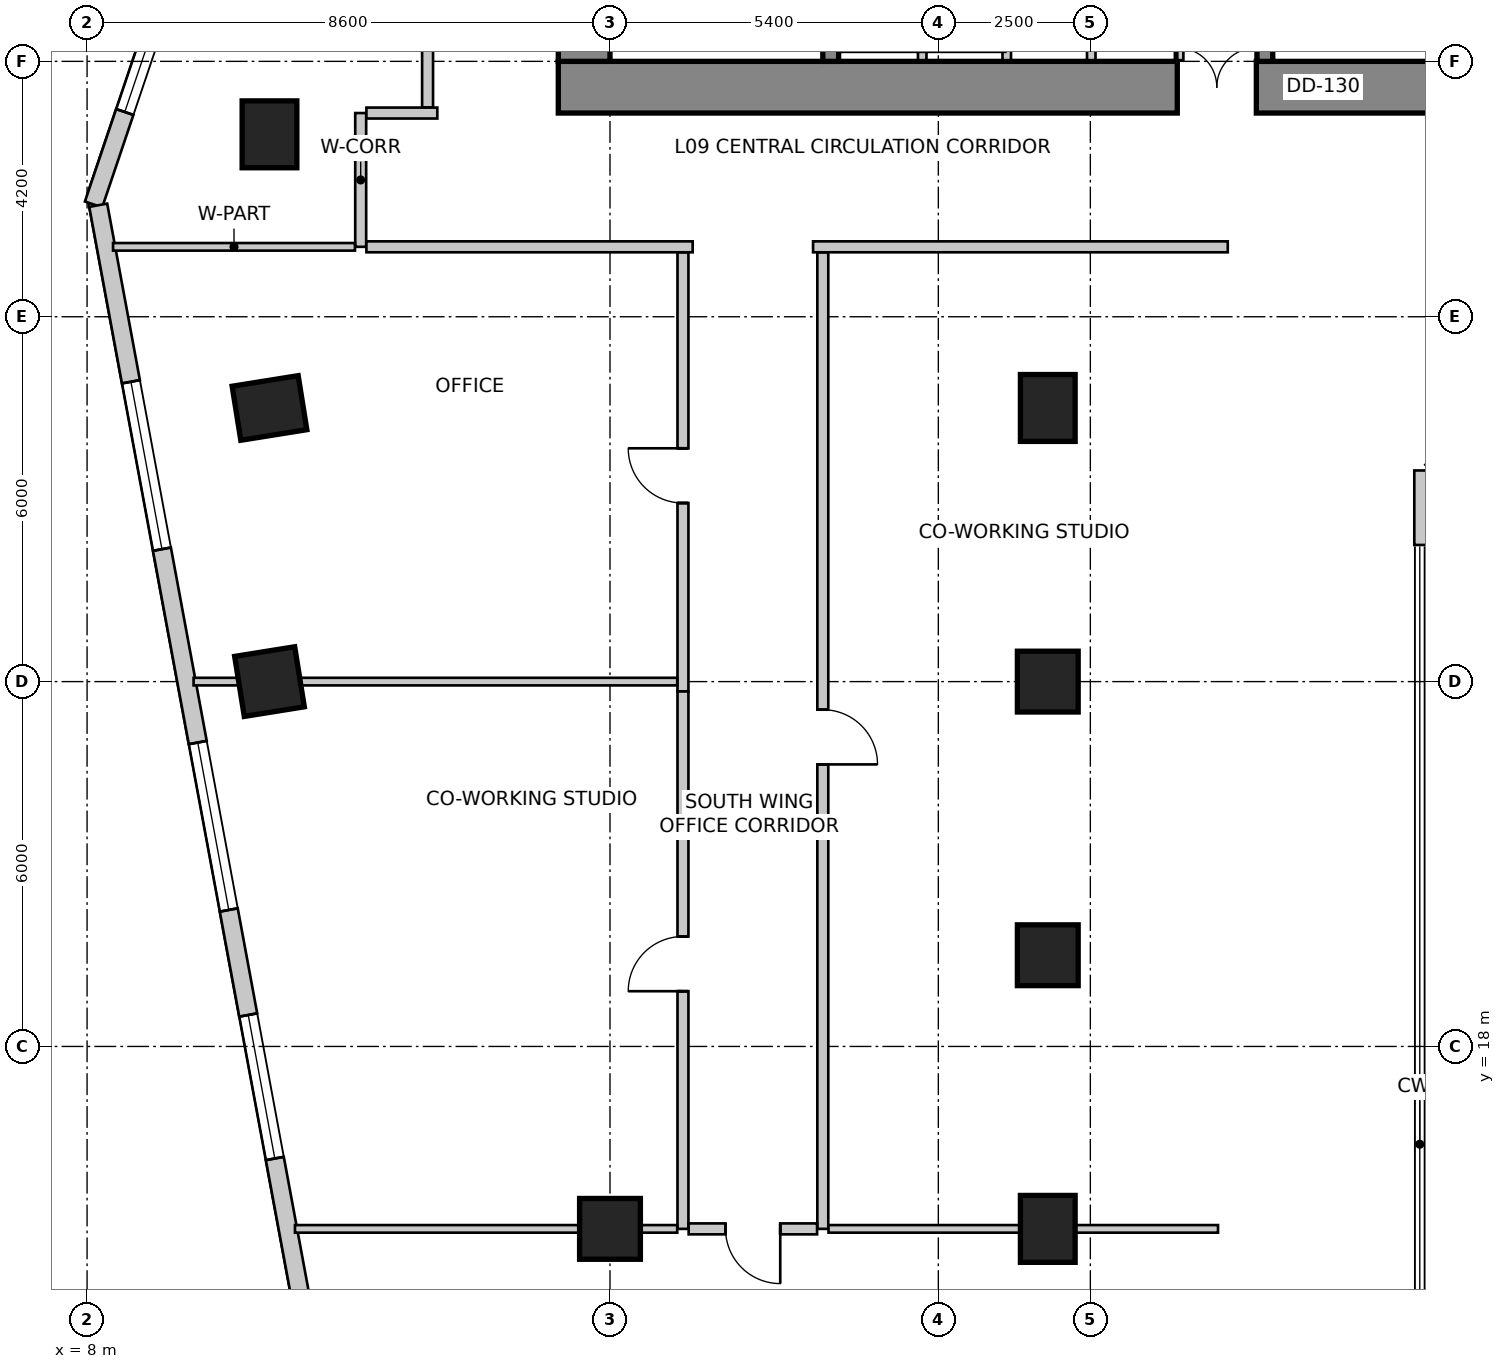
"""IFC4 building model, lengths in metres.
Left out: names, types, materials, properties, quantities, classifications, styles, units other than length and angle.
Written with IfcOpenShell. Run it as: python <this file> out.ifc"""

import sys

from ifc_helpers import new_model, si_unit, direction, frame, frame_2d, origin, origin_2d, place, context, subcontext, project, spatial, rectangle, extrude, source, transform, mapped, element, fill, save


model = new_model("IFC4")
c1 = context("Model", 3, precision=1e-05, world=origin(), true_north=direction((0.0, 1.0)))
c2 = subcontext(c1, "Body", "Model", "MODEL_VIEW")
j1 = project(units=[si_unit("LENGTHUNIT", "METRE"), si_unit("PLANEANGLEUNIT", "RADIAN")], contexts=[c1])
p1 = place(None, origin())
s1 = spatial("IfcSite", under=j1, at=p1, CompositionType="ELEMENT")
p2 = place(p1, origin())
s2 = spatial("IfcBuilding", under=s1, at=p2, CompositionType="ELEMENT")
p3 = place(p2, frame((0.0, 0.0, 39.0)))
s3 = spatial("IfcBuildingStorey", under=s2, at=p3, CompositionType="ELEMENT", Elevation=39.0)
p4 = place(p3, frame((15.75, 33.775, 0.0), z_axis=(0.0, 0.0, 1.0), x_axis=(1.0, 0.0, 0.0)))
e1 = element("IfcWall", 1, at=p4, inside=s3, PredefinedType="SHEAR", context=c2, shape_type="SweptSolid", body=[
    extrude(rectangle(XDim=16.1, YDim=0.85, at=frame_2d((8.05, 0.0))), origin(), (0.0, 0.0, 1.0), 4.0),
])
m1 = source(origin(), c2, "Body", "SweptSolid", [
    extrude(rectangle(XDim=1.3, YDim=2.15, at=frame_2d((0.65, 1.075))), frame((0.0, 0.435, 0.0), z_axis=(0.0, -1.0, 0.0), x_axis=(1.0, 0.0, 0.0)), (0.0, 0.0, 1.0), 0.87),
])
p5 = place(p4, frame((10.18, 0.0, 0.0)))
e2 = element("IfcOpeningElement", 2, at=p5, cuts=e1, PredefinedType="OPENING", context=c2, shape_type="MappedRepresentation", body=[
    mapped(m1, transform((0.0, 0.0, 0.0), scale=1.0)),
])
p6 = place(p3, frame((16.175, 34.2, 0.0), z_axis=(0.0, 0.0, 1.0), x_axis=(0.0, 1.0, 0.0)))
e3 = element("IfcWall", 3, at=p6, inside=s3, PredefinedType="SHEAR", context=c2, shape_type="SweptSolid", body=[
    extrude(rectangle(XDim=11.4, YDim=0.85, at=frame_2d((5.7, 0.0))), origin(), (0.0, 0.0, 1.0), 4.0),
])
m2 = source(origin(), c2, "Body", "SweptSolid", [
    extrude(rectangle(XDim=1.1, YDim=2.15, at=frame_2d((0.55, 1.075))), frame((0.0, 0.435, 0.0), z_axis=(0.0, -1.0, 0.0), x_axis=(1.0, 0.0, 0.0)), (0.0, 0.0, 1.0), 0.87),
])
p7 = place(p6, frame((7.15, 0.0, 0.0)))
e4 = element("IfcOpeningElement", 4, at=p7, cuts=e3, PredefinedType="OPENING", context=c2, shape_type="MappedRepresentation", body=[
    mapped(m2, transform((0.0, 0.0, 0.0), scale=1.0)),
])
p8 = place(p3, frame((20.23, 34.2, 0.0), z_axis=(0.0, 0.0, 1.0), x_axis=(0.0, 1.0, 0.0)))
e5 = element("IfcWall", 5, at=p8, inside=s3, PredefinedType="SHEAR", context=c2, shape_type="SweptSolid", body=[
    extrude(rectangle(XDim=9.06, YDim=0.26, at=frame_2d((4.53, 0.0))), origin(), (0.0, 0.0, 1.0), 4.0),
])
m3 = source(origin(), c2, "Body", "SweptSolid", [
    extrude(rectangle(XDim=1.1, YDim=2.15, at=frame_2d((0.55, 1.075))), frame((0.0, 0.14, 0.0), z_axis=(0.0, -1.0, 0.0), x_axis=(1.0, 0.0, 0.0)), (0.0, 0.0, 1.0), 0.28),
])
p9 = place(p8, frame((7.45, 0.0, 0.0)))
e6 = element("IfcOpeningElement", 6, at=p9, cuts=e5, PredefinedType="OPENING", context=c2, shape_type="MappedRepresentation", body=[
    mapped(m3, transform((0.0, 0.0, 0.0), scale=1.0)),
])
p10 = place(p3, frame((27.37, 34.2, 0.0), z_axis=(0.0, 0.0, 1.0), x_axis=(0.0, 1.0, 0.0)))
e7 = element("IfcWall", 7, at=p10, inside=s3, PredefinedType="SHEAR", context=c2, shape_type="SweptSolid", body=[
    extrude(rectangle(XDim=9.06, YDim=0.26, at=frame_2d((4.53, 0.0))), origin(), (0.0, 0.0, 1.0), 4.0),
])
p11 = place(p10, frame((7.45, 0.0, 0.0)))
e8 = element("IfcOpeningElement", 8, at=p11, cuts=e7, PredefinedType="OPENING", context=c2, shape_type="MappedRepresentation", body=[
    mapped(m3, transform((0.0, 0.0, 0.0), scale=1.0)),
])
m4 = source(origin(), c2, "Body", "SweptSolid", [
    extrude(rectangle(XDim=0.9, YDim=1.1, at=origin_2d()), origin(), (0.0, 0.0, 1.0), 4.0),
])
for number, where, z_axis, x_axis in (
    (9, (11.0, 33.0, 0.0), (0.0, 0.0, 1.0), (1.0, 0.0, 0.0)),
    (10, (11.0, 28.5, 0.0), (0.0, 0.0, 1.0), (0.158, -0.987, 0.0)),
):
    element("IfcColumn", number, at=place(p3, frame(where, z_axis=z_axis, x_axis=x_axis)), inside=s3, PredefinedType="COLUMN", context=c2, shape_type="MappedRepresentation", body=[
        mapped(m4, transform((0.0, 0.0, 0.0), scale=1.0)),
    ])
m5 = source(origin(), c2, "Body", "SweptSolid", [
    extrude(rectangle(XDim=1.0, YDim=1.0, at=origin_2d()), origin(), (0.0, 0.0, 1.0), 4.0),
])
p12 = place(p3, frame((11.0, 24.0, 0.0), z_axis=(0.0, 0.0, 1.0), x_axis=(0.158158067254, -0.987413806751, 0.0)))
e11 = element("IfcColumn", 11, at=p12, inside=s3, PredefinedType="COLUMN", context=c2, shape_type="MappedRepresentation", body=[
    mapped(m5, transform((0.0, 0.0, 0.0), scale=1.0)),
])
p13 = place(p3, frame((23.8, 28.5, 0.0), z_axis=(0.0, 0.0, 1.0), x_axis=(1.0, 0.0, 0.0)))
e12 = element("IfcColumn", 12, at=p13, inside=s3, PredefinedType="COLUMN", context=c2, shape_type="MappedRepresentation", body=[
    mapped(m4, transform((0.0, 0.0, 0.0), scale=1.0)),
])
for number, where, z_axis, x_axis in (
    (13, (23.8, 24.0, 0.0), (0.0, 0.0, 1.0), (1.0, 0.0, 0.0)),
    (14, (23.8, 19.5, 0.0), (0.0, 0.0, 1.0), (1.0, 0.0, 0.0)),
):
    element("IfcColumn", number, at=place(p3, frame(where, z_axis=z_axis, x_axis=x_axis)), inside=s3, PredefinedType="COLUMN", context=c2, shape_type="MappedRepresentation", body=[
        mapped(m5, transform((0.0, 0.0, 0.0), scale=1.0)),
    ])
p14 = place(p3, frame((23.8, 15.0, 0.0), z_axis=(0.0, 0.0, 1.0), x_axis=(1.0, 0.0, 0.0)))
e15 = element("IfcColumn", 15, at=p14, inside=s3, PredefinedType="COLUMN", context=c2, shape_type="MappedRepresentation", body=[
    mapped(m4, transform((0.0, 0.0, 0.0), scale=1.0)),
])
p15 = place(p3, frame((16.6, 15.0, 0.0), z_axis=(0.0, 0.0, 1.0), x_axis=(1.0, 0.0, 0.0)))
e16 = element("IfcColumn", 16, at=p15, inside=s3, PredefinedType="COLUMN", context=c2, shape_type="MappedRepresentation", body=[
    mapped(m5, transform((0.0, 0.0, 0.0), scale=1.0)),
])
p16 = place(p3, frame((29.978, 26.247, 0.0), z_axis=(0.0, 0.0, 1.0), x_axis=(0.0, 1.0, 0.0)))
e17 = element("IfcWall", 17, at=p16, inside=s3, PredefinedType="SOLIDWALL", context=c2, shape_type="SweptSolid", body=[
    extrude(rectangle(XDim=1.225, YDim=0.3, at=frame_2d((0.613, 0.0))), origin(), (0.0, 0.0, 1.0), 3.75),
])
p17 = place(p3, frame((13.269, 47.134, 0.0), z_axis=(0.0, 0.0, 1.0), x_axis=(-0.319920423265, -0.947444416722, 0.0)))
e18 = element("IfcWall", 18, at=p17, inside=s3, PredefinedType="SOLIDWALL", context=c2, shape_type="SweptSolid", body=[
    extrude(rectangle(XDim=16.135, YDim=0.3, at=frame_2d((8.067, 0.0))), origin(), (0.0, 0.0, 1.0), 3.75),
])
m6 = source(origin(), c2, "Body", "SweptSolid", [
    extrude(rectangle(XDim=2.4, YDim=2.2, at=frame_2d((1.2, 1.1))), frame((0.0, 0.16, 0.0), z_axis=(0.0, -1.0, 0.0), x_axis=(1.0, 0.0, 0.0)), (0.0, 0.0, 1.0), 0.32),
])
p18 = place(p17, frame((2.188, 0.0, 0.85)))
e19 = element("IfcOpeningElement", 19, at=p18, cuts=e18, PredefinedType="OPENING", context=c2, shape_type="MappedRepresentation", body=[
    mapped(m6, transform((0.0, 0.0, 0.0), scale=1.0)),
])
m7 = source(origin(), c2, "Body", "SweptSolid", [
    extrude(rectangle(XDim=2.8, YDim=2.4, at=frame_2d((1.4, 1.2))), frame((0.0, 0.16, 0.0), z_axis=(0.0, -1.0, 0.0), x_axis=(1.0, 0.0, 0.0)), (0.0, 0.0, 1.0), 0.32),
])
p19 = place(p17, frame((6.959, 0.0, 0.85)))
e20 = element("IfcOpeningElement", 20, at=p19, cuts=e18, PredefinedType="OPENING", context=c2, shape_type="MappedRepresentation", body=[
    mapped(m7, transform((0.0, 0.0, 0.0), scale=1.0)),
])
p20 = place(p17, frame((12.13, 0.0, 0.85)))
e21 = element("IfcOpeningElement", 21, at=p20, cuts=e18, PredefinedType="OPENING", context=c2, shape_type="MappedRepresentation", body=[
    mapped(m6, transform((0.0, 0.0, 0.0), scale=1.0)),
])
p21 = place(p3, frame((8.183, 31.833, 0.0), z_axis=(0.0, 0.0, 1.0), x_axis=(0.18216364648, -0.983268226834, 0.0)))
e22 = element("IfcWall", 22, at=p21, inside=s3, PredefinedType="SOLIDWALL", context=c2, shape_type="SweptSolid", body=[
    extrude(rectangle(XDim=26.678, YDim=0.3, at=frame_2d((13.339, 0.0))), origin(), (0.0, 0.0, 1.0), 3.75),
])
p22 = place(p21, frame((2.952, 0.0, 0.85)))
e23 = element("IfcOpeningElement", 23, at=p22, cuts=e22, PredefinedType="OPENING", context=c2, shape_type="MappedRepresentation", body=[
    mapped(m7, transform((0.0, 0.0, 0.0), scale=1.0)),
])
p23 = place(p21, frame((8.986, 0.0, 0.85)))
e24 = element("IfcOpeningElement", 24, at=p23, cuts=e22, PredefinedType="OPENING", context=c2, shape_type="MappedRepresentation", body=[
    mapped(m7, transform((0.0, 0.0, 0.0), scale=1.0)),
])
p24 = place(p21, frame((13.543, 0.0, 0.85)))
e25 = element("IfcOpeningElement", 25, at=p24, cuts=e22, PredefinedType="OPENING", context=c2, shape_type="MappedRepresentation", body=[
    mapped(m6, transform((0.0, 0.0, 0.0), scale=1.0)),
])
p25 = place(p21, frame((18.211, 0.0, 0.85)))
e26 = element("IfcOpeningElement", 26, at=p25, cuts=e22, PredefinedType="OPENING", context=c2, shape_type="MappedRepresentation", body=[
    mapped(m7, transform((0.0, 0.0, 0.0), scale=1.0)),
])
p26 = place(p21, frame((22.909, 0.0, 0.85)))
e27 = element("IfcOpeningElement", 27, at=p26, cuts=e22, PredefinedType="OPENING", context=c2, shape_type="MappedRepresentation", body=[
    mapped(m6, transform((0.0, 0.0, 0.0), scale=1.0)),
])
for number, where, z_axis, x_axis in (
    (28, (25.96, 34.22, 0.0), (0.0, 0.0, 1.0), (0.0, 1.0, 0.0)),
    (29, (21.735, 34.22, 0.0), (0.0, 0.0, 1.0), (0.0, 1.0, 0.0)),
    (30, (23.125, 34.22, 0.0), (0.0, 0.0, 1.0), (0.0, 1.0, 0.0)),
    (31, (24.515, 34.22, 0.0), (0.0, 0.0, 1.0), (0.0, 1.0, 0.0)),
):
    element("IfcWall", number, at=place(p3, frame(where, z_axis=z_axis, x_axis=x_axis)), inside=s3, PredefinedType="SOLIDWALL", context=c2, shape_type="SweptSolid", body=[
        extrude(rectangle(XDim=1.62, YDim=0.14, at=frame_2d((0.81, 0.0))), origin(), (0.0, 0.0, 1.0), 3.042),
    ])
p27 = place(p3, frame((12.5, 31.15, 0.0), z_axis=(0.0, 0.0, 1.0), x_axis=(0.0, 1.0, 0.0)))
e32 = element("IfcWall", 32, at=p27, inside=s3, PredefinedType="PARTITIONING", context=c2, shape_type="SweptSolid", body=[
    extrude(rectangle(XDim=2.2, YDim=0.18, at=frame_2d((1.1, 0.0))), origin(), (0.0, 0.0, 1.0), 3.335),
])
p28 = place(p3, frame((12.594, 33.35, 0.0), z_axis=(0.0, 0.0, 1.0), x_axis=(1.0, 0.0, 0.0)))
e33 = element("IfcWall", 33, at=p28, inside=s3, PredefinedType="PARTITIONING", context=c2, shape_type="SweptSolid", body=[
    extrude(rectangle(XDim=1.166, YDim=0.18, at=frame_2d((0.583, 0.0))), origin(), (0.0, 0.0, 1.0), 3.75),
])
p29 = place(p3, frame((17.96, 31.15, 0.0), z_axis=(0.0, 0.0, 1.0), x_axis=(-1.0, 0.0, 0.0)))
e34 = element("IfcWall", 34, at=p29, inside=s3, PredefinedType="PARTITIONING", context=c2, shape_type="SweptSolid", body=[
    extrude(rectangle(XDim=5.366, YDim=0.18, at=frame_2d((2.683, 0.0))), origin(), (0.0, 0.0, 1.0), 3.335),
])
p30 = place(p3, frame((26.76, 31.15, 0.0), z_axis=(0.0, 0.0, 1.0), x_axis=(-1.0, 0.0, 0.0)))
e35 = element("IfcWall", 35, at=p30, inside=s3, PredefinedType="PARTITIONING", context=c2, shape_type="SweptSolid", body=[
    extrude(rectangle(XDim=6.82, YDim=0.18, at=frame_2d((3.41, 0.0))), origin(), (0.0, 0.0, 1.0), 3.335),
])
p31 = place(p3, frame((13.6, 33.444, 0.0), z_axis=(0.0, 0.0, 1.0), x_axis=(0.0, 1.0, 0.0)))
e36 = element("IfcWall", 36, at=p31, inside=s3, PredefinedType="PARTITIONING", context=c2, shape_type="SweptSolid", body=[
    extrude(rectangle(XDim=13.896, YDim=0.18, at=frame_2d((6.948, 0.0))), origin(), (0.0, 0.0, 1.0), 2.892),
])
m8 = source(origin(), c2, "Body", "SweptSolid", [
    extrude(rectangle(XDim=0.9, YDim=2.15, at=frame_2d((0.45, 1.075))), frame((0.0, 0.1, 0.0), z_axis=(0.0, -1.0, 0.0), x_axis=(1.0, 0.0, 0.0)), (0.0, 0.0, 1.0), 0.2),
])
p32 = place(p31, frame((4.144, 0.0, 0.0)))
e37 = element("IfcOpeningElement", 37, at=p32, cuts=e36, PredefinedType="OPENING", context=c2, shape_type="MappedRepresentation", body=[
    mapped(m8, transform((0.0, 0.0, 0.0), scale=1.0)),
])
p33 = place(p3, frame((12.406, 31.15, 0.0), z_axis=(0.0, 0.0, 1.0), x_axis=(-1.0, 0.0, 0.0)))
e38 = element("IfcWall", 38, at=p33, inside=s3, PredefinedType="PARTITIONING", context=c2, shape_type="SweptSolid", body=[
    extrude(rectangle(XDim=3.979, YDim=0.125, at=frame_2d((1.99, 0.0))), origin(), (0.0, 0.0, 1.0), 2.892),
])
p34 = place(p3, frame((17.8, 23.84, 0.0), z_axis=(0.0, 0.0, 1.0), x_axis=(0.0, 1.0, 0.0)))
e39 = element("IfcWall", 39, at=p34, inside=s3, PredefinedType="PARTITIONING", context=c2, shape_type="SweptSolid", body=[
    extrude(rectangle(XDim=7.216, YDim=0.18, at=frame_2d((3.608, 0.0))), origin(), (0.0, 0.0, 1.0), 3.125),
])
p35 = place(p34, frame((3.097, 0.0, 0.0)))
e40 = element("IfcOpeningElement", 40, at=p35, cuts=e39, PredefinedType="OPENING", context=c2, shape_type="MappedRepresentation", body=[
    mapped(m8, transform((0.0, 0.0, 0.0), scale=1.0)),
])
p36 = place(p3, frame((17.8, 15.0, 0.0), z_axis=(0.0, 0.0, 1.0), x_axis=(0.0, 1.0, 0.0)))
e41 = element("IfcWall", 41, at=p36, inside=s3, PredefinedType="PARTITIONING", context=c2, shape_type="SweptSolid", body=[
    extrude(rectangle(XDim=8.838, YDim=0.18, at=frame_2d((4.419, 0.0))), origin(), (0.0, 0.0, 1.0), 2.892),
])
p37 = place(p36, frame((3.908, 0.0, 0.0)))
e42 = element("IfcOpeningElement", 42, at=p37, cuts=e41, PredefinedType="OPENING", context=c2, shape_type="MappedRepresentation", body=[
    mapped(m8, transform((0.0, 0.0, 0.0), scale=1.0)),
])
p38 = place(p3, frame((20.1, 31.056, 0.0), z_axis=(0.0, 0.0, 1.0), x_axis=(0.0, -1.0, 0.0)))
e43 = element("IfcWall", 43, at=p38, inside=s3, PredefinedType="PARTITIONING", context=c2, shape_type="SweptSolid", body=[
    extrude(rectangle(XDim=16.056, YDim=0.18, at=frame_2d((8.028, 0.0))), origin(), (0.0, 0.0, 1.0), 2.892),
])
p39 = place(p38, frame((7.518, 0.0, 0.0)))
e44 = element("IfcOpeningElement", 44, at=p39, cuts=e43, PredefinedType="OPENING", context=c2, shape_type="MappedRepresentation", body=[
    mapped(m8, transform((0.0, 0.0, 0.0), scale=1.0)),
])
p40 = place(p3, frame((20.006, 15.0, 0.0), z_axis=(0.0, 0.0, 1.0), x_axis=(-1.0, 0.0, 0.0)))
e45 = element("IfcWall", 45, at=p40, inside=s3, PredefinedType="PARTITIONING", context=c2, shape_type="SweptSolid", body=[
    extrude(rectangle(XDim=2.112, YDim=0.18, at=frame_2d((1.056, 0.0))), origin(), (0.0, 0.0, 1.0), 2.892),
])
p41 = place(p40, frame((0.606, 0.0, 0.0)))
e46 = element("IfcOpeningElement", 46, at=p41, cuts=e45, PredefinedType="OPENING", context=c2, shape_type="MappedRepresentation", body=[
    mapped(m8, transform((0.0, 0.0, 0.0), scale=1.0)),
])
p42 = place(p3, frame((17.706, 24.0, 0.0), z_axis=(0.0, 0.0, 1.0), x_axis=(-1.0, 0.0, 0.0)))
e47 = element("IfcWall", 47, at=p42, inside=s3, PredefinedType="PARTITIONING", context=c2, shape_type="SweptSolid", body=[
    extrude(rectangle(XDim=7.954, YDim=0.125, at=frame_2d((3.977, 0.0))), origin(), (0.0, 0.0, 1.0), 2.892),
])
p43 = place(p3, frame((17.706, 15.0, 0.0), z_axis=(0.0, 0.0, 1.0), x_axis=(-1.0, 0.0, 0.0)))
e48 = element("IfcWall", 48, at=p43, inside=s3, PredefinedType="PARTITIONING", context=c2, shape_type="SweptSolid", body=[
    extrude(rectangle(XDim=6.287, YDim=0.125, at=frame_2d((3.144, 0.0))), origin(), (0.0, 0.0, 1.0), 2.892),
])
p44 = place(p3, frame((26.6, 15.0, 0.0), z_axis=(0.0, 0.0, 1.0), x_axis=(-1.0, 0.0, 0.0)))
e49 = element("IfcWall", 49, at=p44, inside=s3, PredefinedType="PARTITIONING", context=c2, shape_type="SweptSolid", body=[
    extrude(rectangle(XDim=6.406, YDim=0.125, at=frame_2d((3.203, 0.0))), origin(), (0.0, 0.0, 1.0), 2.892),
])
m9 = source(origin(), c2, "Body", "SweptSolid", [
    extrude(rectangle(XDim=2.4, YDim=2.2, at=frame_2d((1.2, 1.1))), frame((0.0, -0.015, 0.0), z_axis=(0.0, -1.0, 0.0), x_axis=(1.0, 0.0, 0.0)), (0.0, 0.0, 1.0), 0.06),
])
p45 = place(p20, origin())
e50 = element("IfcWindow", 50, at=p45, inside=s3, PartitioningType="SINGLE_PANEL", PredefinedType="WINDOW", context=c2, shape_type="MappedRepresentation", body=[
    mapped(m9, transform((0.0, 0.0, 0.0), scale=1.0)),
])
fill(e21, e50)
m10 = source(origin(), c2, "Body", "SweptSolid", [
    extrude(rectangle(XDim=2.8, YDim=2.4, at=frame_2d((1.4, 1.2))), frame((0.0, -0.015, 0.0), z_axis=(0.0, -1.0, 0.0), x_axis=(1.0, 0.0, 0.0)), (0.0, 0.0, 1.0), 0.06),
])
p46 = place(p22, origin())
e51 = element("IfcWindow", 51, at=p46, inside=s3, PartitioningType="SINGLE_PANEL", PredefinedType="WINDOW", context=c2, shape_type="MappedRepresentation", body=[
    mapped(m10, transform((0.0, 0.0, 0.0), scale=1.0)),
])
fill(e23, e51)
p47 = place(p23, origin())
e52 = element("IfcWindow", 52, at=p47, inside=s3, PartitioningType="SINGLE_PANEL", PredefinedType="WINDOW", context=c2, shape_type="MappedRepresentation", body=[
    mapped(m10, transform((0.0, 0.0, 0.0), scale=1.0)),
])
fill(e24, e52)
p48 = place(p24, origin())
e53 = element("IfcWindow", 53, at=p48, inside=s3, PartitioningType="SINGLE_PANEL", PredefinedType="WINDOW", context=c2, shape_type="MappedRepresentation", body=[
    mapped(m9, transform((0.0, 0.0, 0.0), scale=1.0)),
])
fill(e25, e53)
m11 = source(origin(), c2, "Body", "SweptSolid", [
    extrude(rectangle(XDim=1.3, YDim=2.15, at=frame_2d((0.65, 1.075))), frame((0.0, 0.025, 0.0), z_axis=(0.0, -1.0, 0.0), x_axis=(1.0, 0.0, 0.0)), (0.0, 0.0, 1.0), 0.05),
])
p49 = place(p5, origin())
e54 = element("IfcDoor", 54, at=p49, inside=s3, OperationType="DOUBLE_DOOR_SINGLE_SWING", PredefinedType="DOOR", context=c2, shape_type="MappedRepresentation", body=[
    mapped(m11, transform((0.0, 0.0, 0.0), scale=1.0)),
])
fill(e2, e54)
m12 = source(origin(), c2, "Body", "SweptSolid", [
    extrude(rectangle(XDim=0.9, YDim=2.15, at=frame_2d((0.45, 1.075))), frame((0.0, 0.025, 0.0), z_axis=(0.0, -1.0, 0.0), x_axis=(1.0, 0.0, 0.0)), (0.0, 0.0, 1.0), 0.05),
])
p50 = place(p35, origin())
e55 = element("IfcDoor", 55, at=p50, inside=s3, OperationType="SINGLE_SWING_RIGHT", PredefinedType="DOOR", context=c2, shape_type="MappedRepresentation", body=[
    mapped(m12, transform((0.0, 0.0, 0.0), scale=1.0)),
])
fill(e40, e55)
p51 = place(p37, origin())
e56 = element("IfcDoor", 56, at=p51, inside=s3, OperationType="SINGLE_SWING_LEFT", PredefinedType="DOOR", context=c2, shape_type="MappedRepresentation", body=[
    mapped(m12, transform((0.0, 0.0, 0.0), scale=1.0)),
])
fill(e42, e56)
p52 = place(p39, origin())
e57 = element("IfcDoor", 57, at=p52, inside=s3, OperationType="SINGLE_SWING_RIGHT", PredefinedType="DOOR", context=c2, shape_type="MappedRepresentation", body=[
    mapped(m12, transform((0.0, 0.0, 0.0), scale=1.0)),
])
fill(e44, e57)
p53 = place(p41, origin())
e58 = element("IfcDoor", 58, at=p53, inside=s3, OperationType="SINGLE_SWING_LEFT", PredefinedType="DOOR", context=c2, shape_type="MappedRepresentation", body=[
    mapped(m12, transform((0.0, 0.0, 0.0), scale=1.0)),
])
fill(e46, e58)
save(model, sys.argv[1])
